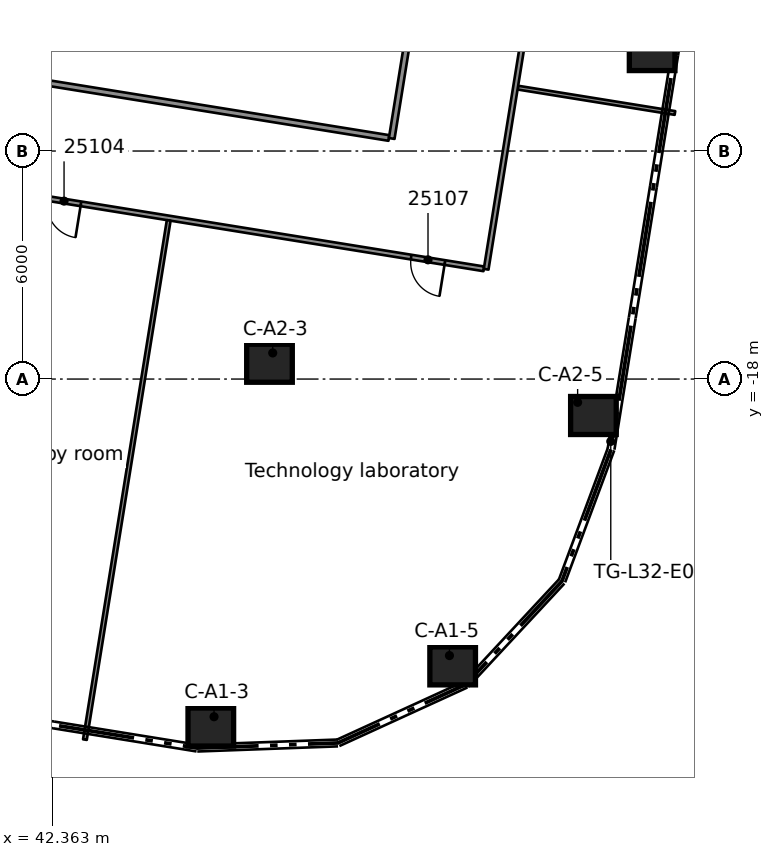
"""IFC4 building model, lengths in metres.
Left out: names, types, materials, properties, quantities, classifications, styles, units other than length and angle.
Written with IfcOpenShell. Run it as: python <this file> out.ifc"""

import sys

from ifc_helpers import new_model, si_unit, direction, frame, frame_2d, origin, origin_2d, place, context, subcontext, project, spatial, rectangle, extrude, element, fill, save


model = new_model("IFC4")
c1 = context("Model", 3, precision=1e-05, world=origin(), true_north=direction((0.0, 1.0)))
c2 = subcontext(c1, "Body", "Model", "MODEL_VIEW")
j1 = project(units=[si_unit("LENGTHUNIT", "METRE"), si_unit("PLANEANGLEUNIT", "RADIAN")], contexts=[c1])
p1 = place(None, origin())
s1 = spatial("IfcSite", under=j1, at=p1, CompositionType="ELEMENT")
p2 = place(p1, origin())
s2 = spatial("IfcBuilding", under=s1, at=p2, CompositionType="ELEMENT")
p3 = place(p2, frame((0.0, 0.0, 127.2)))
s3 = spatial("IfcBuildingStorey", under=s2, at=p3, CompositionType="ELEMENT", Elevation=127.2)
for number, where, z_axis, x_axis in (
    (1, (46.535, -27.156, 0.0), (0.0, 0.0, 1.0), (1.0, 0.0, 0.0)),
    (2, (52.899, -25.547, 0.0), (0.0, 0.0, 1.0), (1.0, 0.0, 0.0)),
    (3, (48.079, -17.584, 0.0), (0.0, 0.0, 1.0), (1.0, 0.0, 0.0)),
    (4, (56.603, -18.959, 0.0), (0.0, 0.0, 1.0), (1.0, 0.0, 0.0)),
    (5, (58.148, -9.383, 0.0), (0.0, 0.0, 1.0), (1.0, 0.0, 0.0)),
):
    element("IfcColumn", number, at=place(p3, frame(where, z_axis=z_axis, x_axis=x_axis)), inside=s3, PredefinedType="COLUMN", context=c2, shape_type="SweptSolid", body=[
        extrude(rectangle(XDim=1.2, YDim=1.0, at=origin_2d()), origin(), (0.0, 0.0, 1.0), 3.5),
    ])
p4 = place(p3, frame((53.719, -15.1, 0.0), z_axis=(0.0, 0.0, 1.0), x_axis=(-0.987235605508, 0.159266629328, 0.0)))
e6 = element("IfcWall", 6, at=p4, inside=s3, PredefinedType="PARTITIONING", context=c2, shape_type="SweptSolid", body=[
    extrude(rectangle(XDim=24.695, YDim=0.125, at=frame_2d((12.348, 0.0))), origin(), (0.0, 0.0, 1.0), 3.08),
])
p5 = place(p4, frame((10.739, 0.0, 0.0)))
e7 = element("IfcOpeningElement", 7, at=p5, cuts=e6, PredefinedType="OPENING", context=c2, shape_type="SweptSolid", body=[
    extrude(rectangle(XDim=0.9, YDim=2.1, at=frame_2d((0.45, 1.05))), frame((0.0, 0.073, 0.0), z_axis=(0.0, -1.0, 0.0), x_axis=(1.0, 0.0, 0.0)), (0.0, 0.0, 1.0), 0.145),
])
p6 = place(p4, frame((1.038, 0.0, 0.0)))
e8 = element("IfcOpeningElement", 8, at=p6, cuts=e6, PredefinedType="OPENING", context=c2, shape_type="SweptSolid", body=[
    extrude(rectangle(XDim=0.9, YDim=2.1, at=frame_2d((0.45, 1.05))), frame((0.0, 0.073, 0.0), z_axis=(0.0, -1.0, 0.0), x_axis=(1.0, 0.0, 0.0)), (0.0, 0.0, 1.0), 0.145),
])
p7 = place(p4, frame((21.488, 0.0, 0.0)))
e9 = element("IfcOpeningElement", 9, at=p7, cuts=e6, PredefinedType="OPENING", context=c2, shape_type="SweptSolid", body=[
    extrude(rectangle(XDim=0.9, YDim=2.1, at=frame_2d((0.45, 1.05))), frame((0.0, 0.073, 0.0), z_axis=(0.0, -1.0, 0.0), x_axis=(1.0, 0.0, 0.0)), (0.0, 0.0, 1.0), 0.145),
])
p8 = place(p4, frame((15.938, 0.0, 0.0)))
e10 = element("IfcOpeningElement", 10, at=p8, cuts=e6, PredefinedType="OPENING", context=c2, shape_type="SweptSolid", body=[
    extrude(rectangle(XDim=0.9, YDim=2.1, at=frame_2d((0.45, 1.05))), frame((0.0, 0.073, 0.0), z_axis=(0.0, -1.0, 0.0), x_axis=(1.0, 0.0, 0.0)), (0.0, 0.0, 1.0), 0.145),
])
p9 = place(p3, frame((29.885, -8.215, 0.0), z_axis=(0.0, 0.0, 1.0), x_axis=(0.987236652076, -0.1592601419, 0.0)))
e11 = element("IfcWall", 11, at=p9, inside=s3, PredefinedType="PARTITIONING", context=c2, shape_type="SweptSolid", body=[
    extrude(rectangle(XDim=21.612, YDim=0.15, at=frame_2d((10.806, 0.0))), origin(), (0.0, 0.0, 1.0), 3.08),
])
p10 = place(p9, frame((7.588, 0.0, 0.0)))
e12 = element("IfcOpeningElement", 12, at=p10, cuts=e11, PredefinedType="OPENING", context=c2, shape_type="SweptSolid", body=[
    extrude(rectangle(XDim=0.9, YDim=2.1, at=frame_2d((0.45, 1.05))), frame((0.0, 0.085, 0.0), z_axis=(0.0, -1.0, 0.0), x_axis=(1.0, 0.0, 0.0)), (0.0, 0.0, 1.0), 0.17),
])
p11 = place(p3, frame((54.615, -10.332, 0.0), z_axis=(0.0, 0.0, 1.0), x_axis=(0.987227218169, -0.15931861067, 0.0)))
e13 = element("IfcWall", 13, at=p11, inside=s3, PredefinedType="PARTITIONING", context=c2, shape_type="SweptSolid", body=[
    extrude(rectangle(XDim=4.187, YDim=0.1, at=frame_2d((2.093, 0.0))), origin(), (0.0, 0.0, 1.0), 3.08),
])
p12 = place(p3, frame((53.78, -15.111, 0.0), z_axis=(0.0, 0.0, 1.0), x_axis=(0.159347260632, 0.987222594215, 0.0)))
e14 = element("IfcWall", 14, at=p12, inside=s3, PredefinedType="PARTITIONING", context=c2, shape_type="SweptSolid", body=[
    extrude(rectangle(XDim=12.701, YDim=0.125, at=frame_2d((6.351, 0.0))), origin(), (0.0, 0.0, 1.0), 3.08),
])
p13 = place(p3, frame((51.295, -11.67, 0.0), z_axis=(0.0, 0.0, 1.0), x_axis=(0.159450148398, 0.987205981635, 0.0)))
e15 = element("IfcWall", 15, at=p13, inside=s3, PredefinedType="PARTITIONING", context=c2, shape_type="SweptSolid", body=[
    extrude(rectangle(XDim=6.699, YDim=0.15, at=frame_2d((3.349, 0.0))), origin(), (0.0, 0.0, 1.0), 3.08),
])
p14 = place(p13, frame((2.85, 0.0, 0.0)))
e16 = element("IfcOpeningElement", 16, at=p14, cuts=e15, PredefinedType="OPENING", context=c2, shape_type="SweptSolid", body=[
    extrude(rectangle(XDim=0.9, YDim=2.1, at=frame_2d((0.45, 1.05))), frame((0.0, 0.085, 0.0), z_axis=(0.0, -1.0, 0.0), x_axis=(1.0, 0.0, 0.0)), (0.0, 0.0, 1.0), 0.17),
])
p15 = place(p3, frame((43.222, -27.487, 0.0), z_axis=(0.0, 0.0, 1.0), x_axis=(0.159350032698, 0.987222146773, 0.0)))
e17 = element("IfcWall", 17, at=p15, inside=s3, PredefinedType="PARTITIONING", context=c2, shape_type="SweptSolid", body=[
    extrude(rectangle(XDim=13.838, YDim=0.1, at=frame_2d((6.919, 0.0))), origin(), (0.0, 0.0, 1.0), 3.08),
])
p16 = place(p5, origin())
e18 = element("IfcDoor", 18, at=p16, inside=s3, OperationType="SINGLE_SWING_LEFT", PredefinedType="DOOR", context=c2, shape_type="SweptSolid", body=[
    extrude(rectangle(XDim=0.9, YDim=2.1, at=frame_2d((0.45, 1.05))), frame((0.0, 0.025, 0.0), z_axis=(0.0, -1.0, 0.0), x_axis=(1.0, 0.0, 0.0)), (0.0, 0.0, 1.0), 0.05),
])
fill(e7, e18)
p17 = place(p6, origin())
e19 = element("IfcDoor", 19, at=p17, inside=s3, OperationType="SINGLE_SWING_LEFT", PredefinedType="DOOR", context=c2, shape_type="SweptSolid", body=[
    extrude(rectangle(XDim=0.9, YDim=2.1, at=frame_2d((0.45, 1.05))), frame((0.0, 0.025, 0.0), z_axis=(0.0, -1.0, 0.0), x_axis=(1.0, 0.0, 0.0)), (0.0, 0.0, 1.0), 0.05),
])
fill(e8, e19)
save(model, sys.argv[1])
